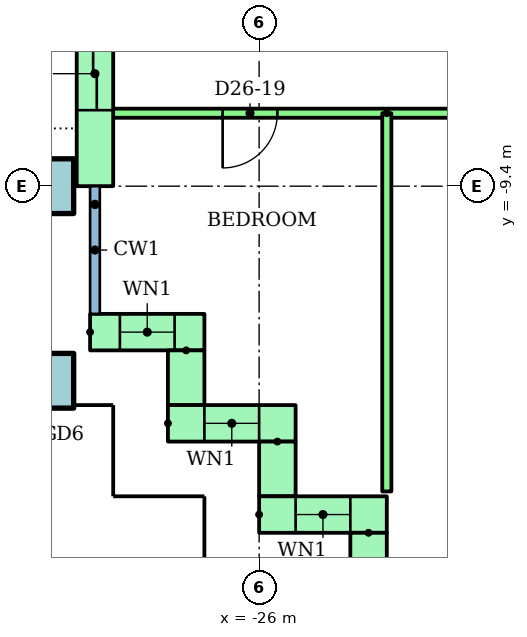
"""IFC4 building model, lengths in metres.
Left out: names, types, materials, properties, quantities, classifications, styles, units other than length and angle.
Written with IfcOpenShell. Run it as: python <this file> out.ifc"""

import sys

from ifc_helpers import new_model, si_unit, direction, frame, frame_2d, origin, origin_2d, place, context, subcontext, project, spatial, rectangle, hollow_rectangle, extrude, element, fill, save


model = new_model("IFC4")
c1 = context("Model", 3, precision=1e-05, world=origin(), true_north=direction((0.0, 1.0)))
c2 = subcontext(c1, "Body", "Model", "MODEL_VIEW")
j1 = project(units=[si_unit("LENGTHUNIT", "METRE"), si_unit("PLANEANGLEUNIT", "RADIAN")], contexts=[c1])
p1 = place(None, origin())
s1 = spatial("IfcSite", under=j1, at=p1, CompositionType="ELEMENT")
p2 = place(p1, origin())
s2 = spatial("IfcBuilding", under=s1, at=p2, CompositionType="ELEMENT")
p3 = place(p2, frame((0.0, 0.0, 99.9)))
s3 = spatial("IfcBuildingStorey", under=s2, at=p3, CompositionType="ELEMENT", Elevation=99.9)
for number, where in (
    (1, (-29.5, -12.6, 0.0)),
    (2, (-29.5, -9.4, 0.0)),
):
    element("IfcColumn", number, at=place(p3, frame(where)), inside=s3, PredefinedType="COLUMN", context=c2, shape_type="SweptSolid", body=[
        extrude(hollow_rectangle(XDim=0.9, YDim=0.9, WallThickness=0.045, at=origin_2d()), origin(), (0.0, 0.0, 1.0), 3.2),
    ])
p4 = place(p3, frame((-28.7, -5.7, 0.0), z_axis=(0.0, 0.0, 1.0), x_axis=(0.0, -1.0, 0.0)))
e3 = element("IfcWall", 3, at=p4, inside=s3, PredefinedType="STANDARD", context=c2, shape_type="SweptSolid", body=[
    extrude(rectangle(XDim=3.7, YDim=0.6, at=frame_2d((1.85, 0.0))), origin(), (0.0, 0.0, 1.0), 2.92),
])
p5 = place(p4, frame((1.25, 0.0, 0.0)))
e4 = element("IfcOpeningElement", 4, at=p5, cuts=e3, PredefinedType="OPENING", context=c2, shape_type="SweptSolid", body=[
    extrude(rectangle(XDim=1.2, YDim=2.1, at=frame_2d((0.6, 1.05))), frame((0.0, 0.31, 0.0), z_axis=(0.0, -1.0, 0.0), x_axis=(1.0, 0.0, 0.0)), (0.0, 0.0, 1.0), 0.62),
])
p6 = place(p3, frame((-28.78, -11.8, 0.0)))
e5 = element("IfcWall", 5, at=p6, inside=s3, PredefinedType="STANDARD", context=c2, shape_type="SweptSolid", body=[
    extrude(rectangle(XDim=1.88, YDim=0.6, at=frame_2d((0.94, 0.0))), origin(), (0.0, 0.0, 1.0), 2.92),
])
p7 = place(p6, frame((0.49, 0.0, 0.9)))
e6 = element("IfcOpeningElement", 6, at=p7, cuts=e5, PredefinedType="OPENING", context=c2, shape_type="SweptSolid", body=[
    extrude(rectangle(XDim=0.9, YDim=1.5, at=frame_2d((0.45, 0.75))), frame((0.0, 0.31, 0.0), z_axis=(0.0, -1.0, 0.0), x_axis=(1.0, 0.0, 0.0)), (0.0, 0.0, 1.0), 0.62),
])
p8 = place(p3, frame((-27.2, -12.1, 0.0), z_axis=(0.0, 0.0, 1.0), x_axis=(0.0, -1.0, 0.0)))
e7 = element("IfcWall", 7, at=p8, inside=s3, PredefinedType="STANDARD", context=c2, shape_type="SweptSolid", body=[
    extrude(rectangle(XDim=0.9, YDim=0.6, at=frame_2d((0.45, 0.0))), origin(), (0.0, 0.0, 1.0), 2.92),
])
p9 = place(p3, frame((-27.5, -13.3, 0.0)))
e8 = element("IfcWall", 8, at=p9, inside=s3, PredefinedType="STANDARD", context=c2, shape_type="SweptSolid", body=[
    extrude(rectangle(XDim=2.1, YDim=0.6, at=frame_2d((1.05, 0.0))), origin(), (0.0, 0.0, 1.0), 2.92),
])
p10 = place(p9, frame((0.6, 0.0, 0.9)))
e9 = element("IfcOpeningElement", 9, at=p10, cuts=e8, PredefinedType="OPENING", context=c2, shape_type="SweptSolid", body=[
    extrude(rectangle(XDim=0.9, YDim=1.5, at=frame_2d((0.45, 0.75))), frame((0.0, 0.31, 0.0), z_axis=(0.0, -1.0, 0.0), x_axis=(1.0, 0.0, 0.0)), (0.0, 0.0, 1.0), 0.62),
])
p11 = place(p3, frame((-25.7, -13.6, 0.0), z_axis=(0.0, 0.0, 1.0), x_axis=(0.0, -1.0, 0.0)))
e10 = element("IfcWall", 10, at=p11, inside=s3, PredefinedType="STANDARD", context=c2, shape_type="SweptSolid", body=[
    extrude(rectangle(XDim=0.9, YDim=0.6, at=frame_2d((0.45, 0.0))), origin(), (0.0, 0.0, 1.0), 2.92),
])
p12 = place(p3, frame((-26.0, -14.8, 0.0)))
e11 = element("IfcWall", 11, at=p12, inside=s3, PredefinedType="STANDARD", context=c2, shape_type="SweptSolid", body=[
    extrude(rectangle(XDim=2.1, YDim=0.6, at=frame_2d((1.05, 0.0))), origin(), (0.0, 0.0, 1.0), 2.92),
])
p13 = place(p12, frame((0.6, 0.0, 0.9)))
e12 = element("IfcOpeningElement", 12, at=p13, cuts=e11, PredefinedType="OPENING", context=c2, shape_type="SweptSolid", body=[
    extrude(rectangle(XDim=0.9, YDim=1.5, at=frame_2d((0.45, 0.75))), frame((0.0, 0.31, 0.0), z_axis=(0.0, -1.0, 0.0), x_axis=(1.0, 0.0, 0.0)), (0.0, 0.0, 1.0), 0.62),
])
p14 = place(p3, frame((-24.2, -15.1, 0.0), z_axis=(0.0, 0.0, 1.0), x_axis=(0.0, -1.0, 0.0)))
e13 = element("IfcWall", 13, at=p14, inside=s3, PredefinedType="STANDARD", context=c2, shape_type="SweptSolid", body=[
    extrude(rectangle(XDim=1.28, YDim=0.6, at=frame_2d((0.64, 0.0))), origin(), (0.0, 0.0, 1.0), 2.92),
])
p15 = place(p3, frame((-6.0, -8.2, 0.0), z_axis=(0.0, 0.0, 1.0), x_axis=(-1.0, 0.0, 0.0)))
e14 = element("IfcWall", 14, at=p15, inside=s3, PredefinedType="PARTITIONING", context=c2, shape_type="SweptSolid", body=[
    extrude(rectangle(XDim=22.61, YDim=0.15, at=frame_2d((11.305, 0.0))), origin(), (0.0, 0.0, 1.0), 2.4),
])
p16 = place(p15, frame((19.7, 0.0, 0.0)))
e15 = element("IfcOpeningElement", 15, at=p16, cuts=e14, PredefinedType="OPENING", context=c2, shape_type="SweptSolid", body=[
    extrude(rectangle(XDim=0.9, YDim=2.1, at=frame_2d((0.45, 1.05))), frame((0.0, 0.085, 0.0), z_axis=(0.0, -1.0, 0.0), x_axis=(1.0, 0.0, 0.0)), (0.0, 0.0, 1.0), 0.17),
])
p17 = place(p15, frame((14.411, 0.0, 0.0)))
e16 = element("IfcOpeningElement", 16, at=p17, cuts=e14, PredefinedType="OPENING", context=c2, shape_type="SweptSolid", body=[
    extrude(rectangle(XDim=0.9, YDim=2.1, at=frame_2d((0.45, 1.05))), frame((0.0, 0.085, 0.0), z_axis=(0.0, -1.0, 0.0), x_axis=(1.0, 0.0, 0.0)), (0.0, 0.0, 1.0), 0.17),
])
p18 = place(p15, frame((9.55, 0.0, 0.0)))
e17 = element("IfcOpeningElement", 17, at=p18, cuts=e14, PredefinedType="OPENING", context=c2, shape_type="SweptSolid", body=[
    extrude(rectangle(XDim=0.9, YDim=2.1, at=frame_2d((0.45, 1.05))), frame((0.0, 0.085, 0.0), z_axis=(0.0, -1.0, 0.0), x_axis=(1.0, 0.0, 0.0)), (0.0, 0.0, 1.0), 0.17),
])
p19 = place(p15, frame((5.55, 0.0, 0.0)))
e18 = element("IfcOpeningElement", 18, at=p19, cuts=e14, PredefinedType="OPENING", context=c2, shape_type="SweptSolid", body=[
    extrude(rectangle(XDim=0.9, YDim=2.1, at=frame_2d((0.45, 1.05))), frame((0.0, 0.085, 0.0), z_axis=(0.0, -1.0, 0.0), x_axis=(1.0, 0.0, 0.0)), (0.0, 0.0, 1.0), 0.17),
])
p20 = place(p15, frame((1.5, 0.0, 0.0)))
e19 = element("IfcOpeningElement", 19, at=p20, cuts=e14, PredefinedType="OPENING", context=c2, shape_type="SweptSolid", body=[
    extrude(rectangle(XDim=1.0, YDim=2.1, at=frame_2d((0.5, 1.05))), frame((0.0, 0.085, 0.0), z_axis=(0.0, -1.0, 0.0), x_axis=(1.0, 0.0, 0.0)), (0.0, 0.0, 1.0), 0.17),
])
p21 = place(p3, frame((-23.9, -8.2, 0.0), z_axis=(0.0, 0.0, 1.0), x_axis=(0.0, -1.0, 0.0)))
e20 = element("IfcWall", 20, at=p21, inside=s3, PredefinedType="PARTITIONING", context=c2, shape_type="SweptSolid", body=[
    extrude(rectangle(XDim=6.22, YDim=0.15, at=frame_2d((3.11, 0.0))), origin(), (0.0, 0.0, 1.0), 2.4),
])
p22 = place(p7, origin())
e21 = element("IfcWindow", 21, at=p22, inside=s3, PartitioningType="SINGLE_PANEL", PredefinedType="WINDOW", context=c2, shape_type="SweptSolid", body=[
    extrude(rectangle(XDim=0.9, YDim=1.5, at=frame_2d((0.45, 0.75))), frame((0.0, 0.03, 0.0), z_axis=(0.0, -1.0, 0.0), x_axis=(1.0, 0.0, 0.0)), (0.0, 0.0, 1.0), 0.06),
])
fill(e6, e21)
p23 = place(p10, origin())
e22 = element("IfcWindow", 22, at=p23, inside=s3, PartitioningType="SINGLE_PANEL", PredefinedType="WINDOW", context=c2, shape_type="SweptSolid", body=[
    extrude(rectangle(XDim=0.9, YDim=1.5, at=frame_2d((0.45, 0.75))), frame((0.0, 0.03, 0.0), z_axis=(0.0, -1.0, 0.0), x_axis=(1.0, 0.0, 0.0)), (0.0, 0.0, 1.0), 0.06),
])
fill(e9, e22)
p24 = place(p13, origin())
e23 = element("IfcWindow", 23, at=p24, inside=s3, PartitioningType="SINGLE_PANEL", PredefinedType="WINDOW", context=c2, shape_type="SweptSolid", body=[
    extrude(rectangle(XDim=0.9, YDim=1.5, at=frame_2d((0.45, 0.75))), frame((0.0, 0.03, 0.0), z_axis=(0.0, -1.0, 0.0), x_axis=(1.0, 0.0, 0.0)), (0.0, 0.0, 1.0), 0.06),
])
fill(e12, e23)
p25 = place(p16, origin())
e24 = element("IfcDoor", 24, at=p25, inside=s3, OperationType="SINGLE_SWING_RIGHT", PredefinedType="DOOR", context=c2, shape_type="SweptSolid", body=[
    extrude(rectangle(XDim=0.9, YDim=2.1, at=frame_2d((0.45, 1.05))), frame((0.0, 0.025, 0.0), z_axis=(0.0, -1.0, 0.0), x_axis=(1.0, 0.0, 0.0)), (0.0, 0.0, 1.0), 0.05),
])
fill(e15, e24)
p26 = place(p5, origin())
e25 = element("IfcDoor", 25, at=p26, inside=s3, OperationType="SLIDING_TO_LEFT", PredefinedType="DOOR", context=c2, shape_type="SweptSolid", body=[
    extrude(rectangle(XDim=1.2, YDim=2.1, at=frame_2d((0.6, 1.05))), frame((0.0, 0.025, 0.0), z_axis=(0.0, -1.0, 0.0), x_axis=(1.0, 0.0, 0.0)), (0.0, 0.0, 1.0), 0.05),
])
fill(e4, e25)
save(model, sys.argv[1])
